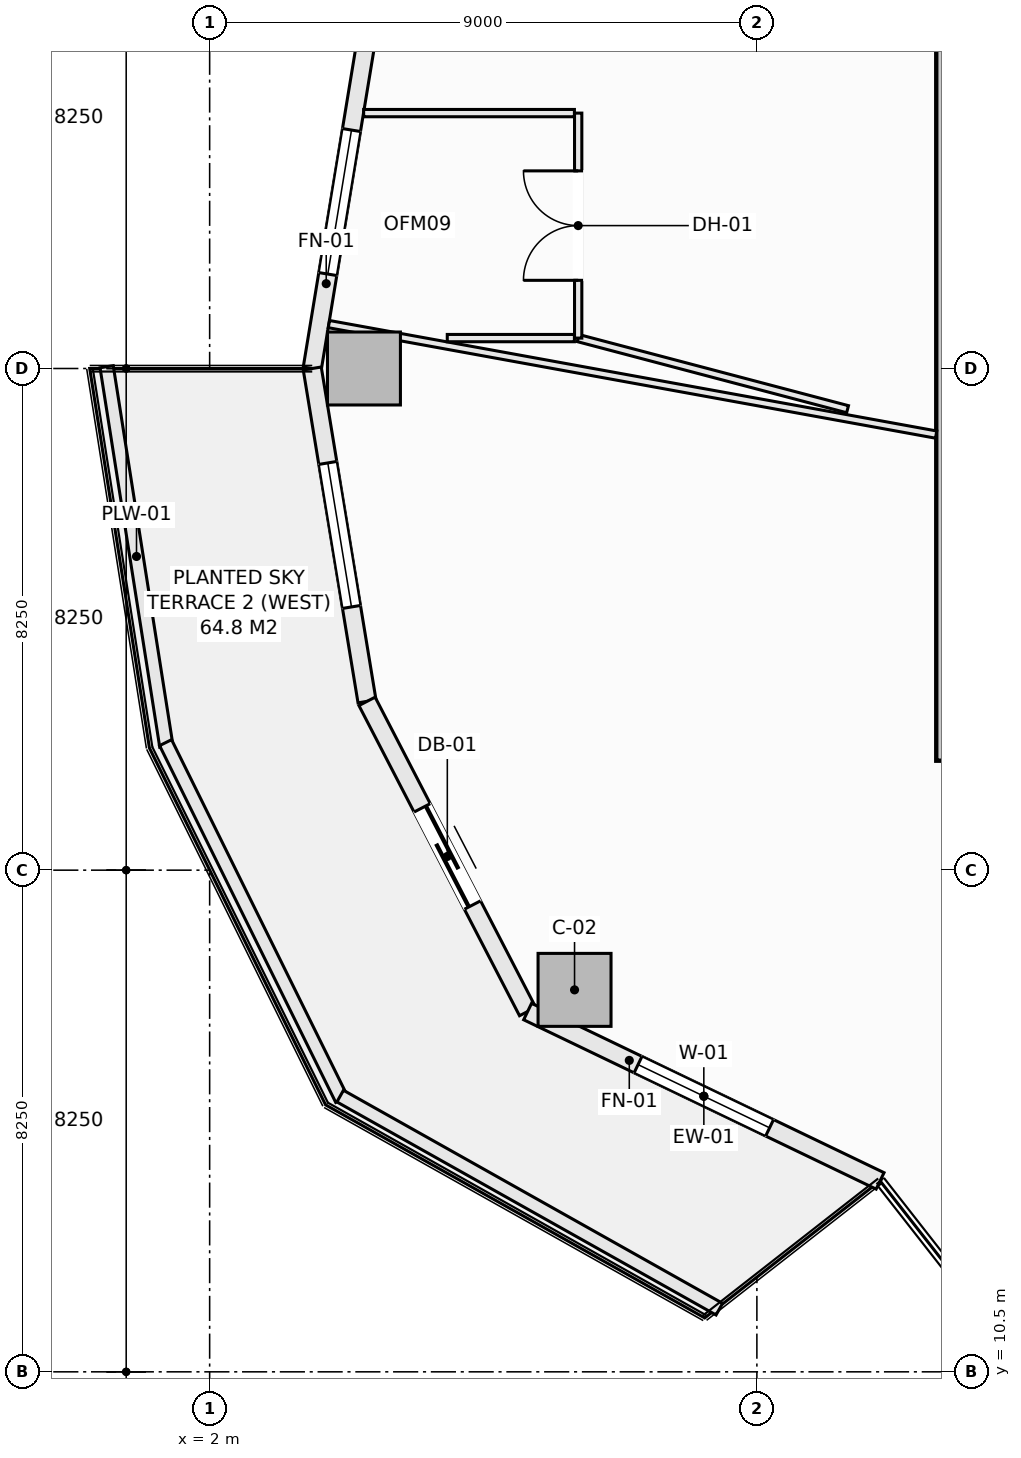
"""IFC4 building model, lengths in metres.
Left out: names, types, materials, properties, quantities, classifications, styles, units other than length and angle.
Written with IfcOpenShell. Run it as: python <this file> out.ifc"""

import sys

from ifc_helpers import new_model, si_unit, direction, frame, frame_2d, origin, origin_2d, place, context, subcontext, project, spatial, rectangle, extrude, element, fill, save


model = new_model("IFC4")
c1 = context("Model", 3, precision=1e-05, world=origin(), true_north=direction((0.0, 1.0)))
c2 = subcontext(c1, "Body", "Model", "MODEL_VIEW")
j1 = project(units=[si_unit("LENGTHUNIT", "METRE"), si_unit("PLANEANGLEUNIT", "RADIAN")], contexts=[c1])
p1 = place(None, origin())
s1 = spatial("IfcSite", under=j1, at=p1, CompositionType="ELEMENT")
p2 = place(p1, origin())
s2 = spatial("IfcBuilding", under=s1, at=p2, CompositionType="ELEMENT")
p3 = place(p2, frame((0.0, 0.0, 68.85)))
s3 = spatial("IfcBuildingStorey", under=s2, at=p3, CompositionType="ELEMENT", Elevation=68.85)
p4 = place(p3, frame((14.375, 20.55, -0.28), z_axis=(0.0, 0.0, 1.0), x_axis=(0.0, 1.0, 0.0)))
e1 = element("IfcWall", 1, at=p4, inside=s3, PredefinedType="SHEAR", context=c2, shape_type="SweptSolid", body=[
    extrude(rectangle(XDim=12.9, YDim=0.85, at=frame_2d((6.45, 0.0))), origin(), (0.0, 0.0, 1.0), 3.85),
])
for number, where, z_axis, x_axis in (
    (2, (4.538, 27.0, -0.28), (0.0, 0.0, 1.0), (1.0, 0.0, 0.0)),
    (3, (8.001, 16.781, -0.28), (0.0, 0.0, 1.0), (1.0, 0.0, 0.0)),
):
    element("IfcColumn", number, at=place(p3, frame(where, z_axis=z_axis, x_axis=x_axis)), inside=s3, PredefinedType="COLUMN", context=c2, shape_type="SweptSolid", body=[
        extrude(rectangle(XDim=1.2, YDim=1.2, at=origin_2d()), origin(), (0.0, 0.0, 1.0), 3.85),
    ])
p5 = place(p3, frame((3.688, 27.0, 0.0), z_axis=(0.0, 0.0, 1.0), x_axis=(0.162386212206, 0.986727276447, 0.0)))
e4 = element("IfcWall", 4, at=p5, inside=s3, PredefinedType="SOLIDWALL", context=c2, shape_type="SweptSolid", body=[
    extrude(rectangle(XDim=5.548, YDim=0.3, at=frame_2d((2.774, 0.0))), origin(), (0.0, 0.0, 1.0), 3.093),
])
p6 = place(p5, frame((1.574, 0.0, 0.85)))
e5 = element("IfcOpeningElement", 5, at=p6, cuts=e4, PredefinedType="OPENING", context=c2, shape_type="SweptSolid", body=[
    extrude(rectangle(XDim=2.4, YDim=1.9, at=frame_2d((1.2, 0.95))), frame((0.0, 0.16, 0.0), z_axis=(0.0, -1.0, 0.0), x_axis=(1.0, 0.0, 0.0)), (0.0, 0.0, 1.0), 0.32),
])
p7 = place(p3, frame((3.688, 27.0, 0.0), z_axis=(0.0, 0.0, 1.0), x_axis=(0.162386212206, -0.986727276447, 0.0)))
e6 = element("IfcWall", 6, at=p7, inside=s3, PredefinedType="SOLIDWALL", context=c2, shape_type="SweptSolid", body=[
    extrude(rectangle(XDim=5.548, YDim=0.3, at=frame_2d((2.774, 0.0))), origin(), (0.0, 0.0, 1.0), 3.093),
])
p8 = place(p7, frame((1.574, 0.0, 0.85)))
e7 = element("IfcOpeningElement", 7, at=p8, cuts=e6, PredefinedType="OPENING", context=c2, shape_type="SweptSolid", body=[
    extrude(rectangle(XDim=2.4, YDim=1.9, at=frame_2d((1.2, 0.95))), frame((0.0, 0.16, 0.0), z_axis=(0.0, -1.0, 0.0), x_axis=(1.0, 0.0, 0.0)), (0.0, 0.0, 1.0), 0.32),
])
p9 = place(p3, frame((4.588, 21.526, 0.0), z_axis=(0.0, 0.0, 1.0), x_axis=(0.459800981414, -0.888021991558, 0.0)))
e8 = element("IfcWall", 8, at=p9, inside=s3, PredefinedType="SOLIDWALL", context=c2, shape_type="SweptSolid", body=[
    extrude(rectangle(XDim=5.744, YDim=0.3, at=frame_2d((2.872, 0.0))), origin(), (0.0, 0.0, 1.0), 3.093),
])
p10 = place(p9, frame((1.972, 0.0, 0.0)))
e9 = element("IfcOpeningElement", 9, at=p10, cuts=e8, PredefinedType="OPENING", context=c2, shape_type="SweptSolid", body=[
    extrude(rectangle(XDim=1.8, YDim=2.25, at=frame_2d((0.9, 1.125))), frame((0.0, 0.16, 0.0), z_axis=(0.0, -1.0, 0.0), x_axis=(1.0, 0.0, 0.0)), (0.0, 0.0, 1.0), 0.32),
])
p11 = place(p3, frame((7.229, 16.425, 0.0), z_axis=(0.0, 0.0, 1.0), x_axis=(0.901354747727, -0.433081538224, 0.0)))
e10 = element("IfcWall", 10, at=p11, inside=s3, PredefinedType="SOLIDWALL", context=c2, shape_type="SweptSolid", body=[
    extrude(rectangle(XDim=6.431, YDim=0.3, at=frame_2d((3.215, 0.0))), origin(), (0.0, 0.0, 1.0), 3.093),
])
p12 = place(p11, frame((2.015, 0.0, 0.85)))
e11 = element("IfcOpeningElement", 11, at=p12, cuts=e10, PredefinedType="OPENING", context=c2, shape_type="SweptSolid", body=[
    extrude(rectangle(XDim=2.4, YDim=1.9, at=frame_2d((1.2, 0.95))), frame((0.0, 0.16, 0.0), z_axis=(0.0, -1.0, 0.0), x_axis=(1.0, 0.0, 0.0)), (0.0, 0.0, 1.0), 0.32),
])
p13 = place(p3, frame((0.306, 27.029, 0.0), z_axis=(0.0, 0.0, 1.0), x_axis=(0.15545655238, -0.987842730561, 0.0)))
e12 = element("IfcWall", 12, at=p13, inside=s3, PredefinedType="PARAPET", context=c2, shape_type="SweptSolid", body=[
    extrude(rectangle(XDim=6.318, YDim=0.22, at=frame_2d((3.159, 0.0))), origin(), (0.0, 0.0, 1.0), 0.52),
])
p14 = place(p3, frame((1.275, 20.847, 0.0), z_axis=(0.0, 0.0, 1.0), x_axis=(0.442686636348, -0.89667638644, 0.0)))
e13 = element("IfcWall", 13, at=p14, inside=s3, PredefinedType="PARAPET", context=c2, shape_type="SweptSolid", body=[
    extrude(rectangle(XDim=6.545, YDim=0.22, at=frame_2d((3.272, 0.0))), origin(), (0.0, 0.0, 1.0), 0.52),
])
p15 = place(p3, frame((4.147, 15.034, 0.0), z_axis=(0.0, 0.0, 1.0), x_axis=(0.871775109335, -0.489906275468, 0.0)))
e14 = element("IfcWall", 14, at=p15, inside=s3, PredefinedType="PARAPET", context=c2, shape_type="SweptSolid", body=[
    extrude(rectangle(XDim=7.152, YDim=0.22, at=frame_2d((3.576, 0.0))), origin(), (0.0, 0.0, 1.0), 0.52),
])
p16 = place(p3, frame((3.962, 27.73, 0.0), z_axis=(0.0, 0.0, 1.0), x_axis=(0.983849121981, -0.178999735131, 0.0)))
e15 = element("IfcWall", 15, at=p16, inside=s3, PredefinedType="PARTITIONING", context=c2, shape_type="SweptSolid", body=[
    extrude(rectangle(XDim=10.15, YDim=0.12, at=frame_2d((5.075, 0.0))), origin(), (0.0, 0.0, 1.0), 2.934),
])
p17 = place(p3, frame((8.061, 27.5, 0.0), z_axis=(0.0, 0.0, 1.0), x_axis=(0.96688100249, -0.255227598475, 0.0)))
e16 = element("IfcWall", 16, at=p17, inside=s3, PredefinedType="PARTITIONING", context=c2, shape_type="SweptSolid", body=[
    extrude(rectangle(XDim=4.582, YDim=0.12, at=frame_2d((2.291, 0.0))), origin(), (0.0, 0.0, 1.0), 2.934),
])
p18 = place(p3, frame((8.061, 27.5, 0.0), z_axis=(0.0, 0.0, 1.0), x_axis=(0.0, 1.0, 0.0)))
e17 = element("IfcWall", 17, at=p18, inside=s3, PredefinedType="PARTITIONING", context=c2, shape_type="SweptSolid", body=[
    extrude(rectangle(XDim=3.7, YDim=0.12, at=frame_2d((1.85, 0.0))), origin(), (0.0, 0.0, 1.0), 3.57),
])
p19 = place(p18, frame((0.95, 0.0, 0.0)))
e18 = element("IfcOpeningElement", 18, at=p19, cuts=e17, PredefinedType="OPENING", context=c2, shape_type="SweptSolid", body=[
    extrude(rectangle(XDim=1.8, YDim=2.3, at=frame_2d((0.9, 1.15))), frame((0.0, 0.07, 0.0), z_axis=(0.0, -1.0, 0.0), x_axis=(1.0, 0.0, 0.0)), (0.0, 0.0, 1.0), 0.14),
])
p20 = place(p3, frame((4.533, 31.2, 0.0), z_axis=(0.0, 0.0, 1.0), x_axis=(1.0, 0.0, 0.0)))
e19 = element("IfcWall", 19, at=p20, inside=s3, PredefinedType="PARTITIONING", context=c2, shape_type="SweptSolid", body=[
    extrude(rectangle(XDim=3.466, YDim=0.12, at=frame_2d((1.733, 0.0))), origin(), (0.0, 0.0, 1.0), 3.57),
])
p21 = place(p3, frame((5.908, 27.5, 0.0), z_axis=(0.0, 0.0, 1.0), x_axis=(1.0, 0.0, 0.0)))
e20 = element("IfcWall", 20, at=p21, inside=s3, PredefinedType="PARTITIONING", context=c2, shape_type="SweptSolid", body=[
    extrude(rectangle(XDim=2.091, YDim=0.12, at=frame_2d((1.045, 0.0))), origin(), (0.0, 0.0, 1.0), 3.57),
])
p22 = place(p6, origin())
e21 = element("IfcWindow", 21, at=p22, inside=s3, PartitioningType="SINGLE_PANEL", PredefinedType="WINDOW", context=c2, shape_type="SweptSolid", body=[
    extrude(rectangle(XDim=2.4, YDim=1.9, at=frame_2d((1.2, 0.95))), frame((0.0, 0.03, 0.0), z_axis=(0.0, -1.0, 0.0), x_axis=(1.0, 0.0, 0.0)), (0.0, 0.0, 1.0), 0.06),
])
fill(e5, e21)
p23 = place(p8, origin())
e22 = element("IfcWindow", 22, at=p23, inside=s3, PartitioningType="SINGLE_PANEL", PredefinedType="WINDOW", context=c2, shape_type="SweptSolid", body=[
    extrude(rectangle(XDim=2.4, YDim=1.9, at=frame_2d((1.2, 0.95))), frame((0.0, 0.03, 0.0), z_axis=(0.0, -1.0, 0.0), x_axis=(1.0, 0.0, 0.0)), (0.0, 0.0, 1.0), 0.06),
])
fill(e7, e22)
p24 = place(p10, frame((1.8, 0.0, 0.0), z_axis=(0.0, 0.0, 1.0), x_axis=(-1.0, 0.0, 0.0)))
e23 = element("IfcDoor", 23, at=p24, inside=s3, OperationType="SLIDING_TO_LEFT", PredefinedType="DOOR", context=c2, shape_type="SweptSolid", body=[
    extrude(rectangle(XDim=1.8, YDim=2.25, at=frame_2d((0.9, 1.125))), frame((0.0, 0.025, 0.0), z_axis=(0.0, -1.0, 0.0), x_axis=(1.0, 0.0, 0.0)), (0.0, 0.0, 1.0), 0.05),
])
fill(e9, e23)
p25 = place(p12, origin())
e24 = element("IfcWindow", 24, at=p25, inside=s3, PartitioningType="SINGLE_PANEL", PredefinedType="WINDOW", context=c2, shape_type="SweptSolid", body=[
    extrude(rectangle(XDim=2.4, YDim=1.9, at=frame_2d((1.2, 0.95))), frame((0.0, 0.03, 0.0), z_axis=(0.0, -1.0, 0.0), x_axis=(1.0, 0.0, 0.0)), (0.0, 0.0, 1.0), 0.06),
])
fill(e11, e24)
p26 = place(p19, origin())
e25 = element("IfcDoor", 25, at=p26, inside=s3, OperationType="DOUBLE_DOOR_SINGLE_SWING", PredefinedType="DOOR", context=c2, shape_type="SweptSolid", body=[
    extrude(rectangle(XDim=1.8, YDim=2.3, at=frame_2d((0.9, 1.15))), frame((0.0, 0.025, 0.0), z_axis=(0.0, -1.0, 0.0), x_axis=(1.0, 0.0, 0.0)), (0.0, 0.0, 1.0), 0.05),
])
fill(e18, e25)
save(model, sys.argv[1])
